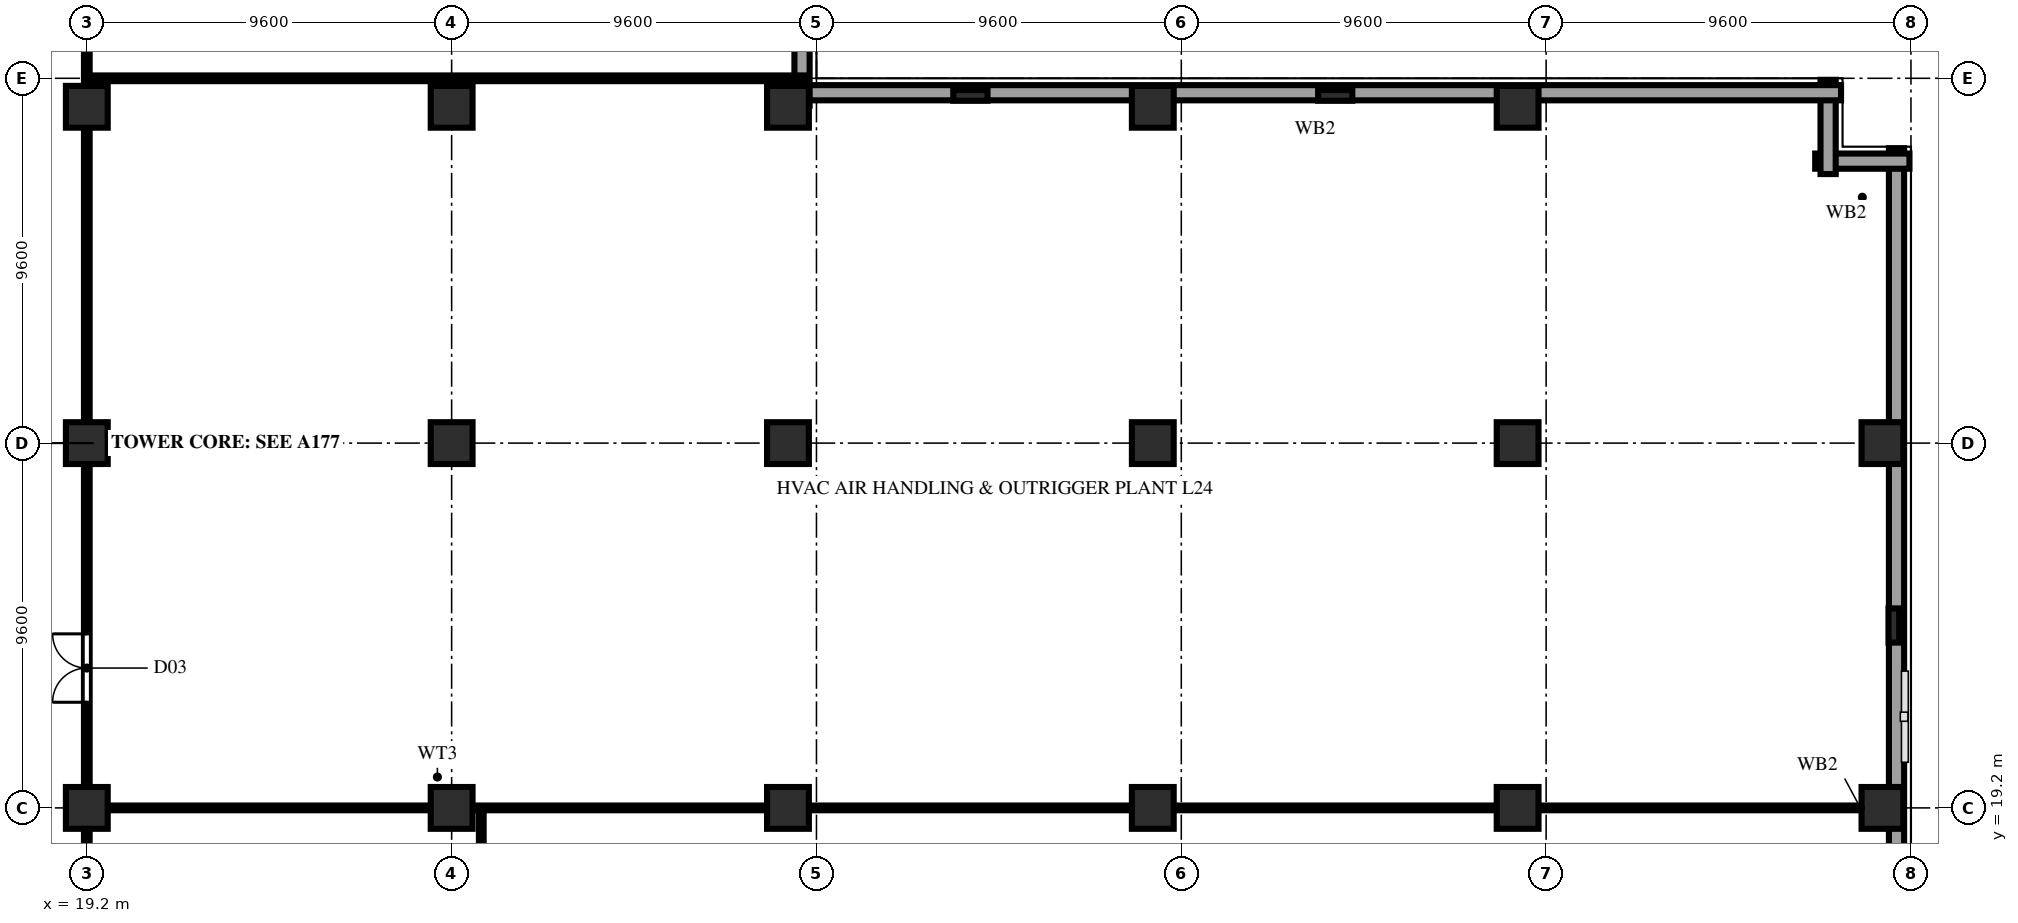
"""IFC4 building model, lengths in metres.
Left out: names, types, materials, properties, quantities, classifications, styles, units other than length and angle.
Written with IfcOpenShell. Run it as: python <this file> out.ifc"""

import sys

from ifc_helpers import new_model, si_unit, direction, frame, frame_2d, origin, origin_2d, place, context, subcontext, project, spatial, rectangle, extrude, element, fill, save


model = new_model("IFC4")
c1 = context("Model", 3, precision=1e-05, world=origin(), true_north=direction((0.0, 1.0)))
c2 = subcontext(c1, "Body", "Model", "MODEL_VIEW")
j1 = project(units=[si_unit("LENGTHUNIT", "METRE"), si_unit("PLANEANGLEUNIT", "RADIAN")], contexts=[c1])
p1 = place(None, origin())
s1 = spatial("IfcSite", under=j1, at=p1, CompositionType="ELEMENT")
p2 = place(p1, origin())
s2 = spatial("IfcBuilding", under=s1, at=p2, CompositionType="ELEMENT")
p3 = place(p2, frame((0.0, 0.0, 96.4)))
s3 = spatial("IfcBuildingStorey", under=s2, at=p3, CompositionType="ELEMENT", Elevation=96.4)
for number, where, z_axis, x_axis in (
    (1, (19.2, 19.2, 0.0), (0.0, 0.0, 1.0), (1.0, 0.0, 0.0)),
    (2, (19.2, 28.8, 0.0), (0.0, 0.0, 1.0), (1.0, 0.0, 0.0)),
    (3, (19.2, 37.65, 0.0), (0.0, 0.0, 1.0), (1.0, 0.0, 0.0)),
    (4, (28.8, 19.2, 0.0), (0.0, 0.0, 1.0), (1.0, 0.0, 0.0)),
    (5, (28.8, 28.8, 0.0), (0.0, 0.0, 1.0), (1.0, 0.0, 0.0)),
    (6, (28.8, 37.65, 0.0), (0.0, 0.0, 1.0), (1.0, 0.0, 0.0)),
    (7, (37.65, 19.2, 0.0), (0.0, 0.0, 1.0), (1.0, 0.0, 0.0)),
    (8, (37.65, 28.8, 0.0), (0.0, 0.0, 1.0), (1.0, 0.0, 0.0)),
    (9, (37.65, 37.65, 0.0), (0.0, 0.0, 1.0), (1.0, 0.0, 0.0)),
    (10, (47.25, 19.2, 0.0), (0.0, 0.0, 1.0), (1.0, 0.0, 0.0)),
    (11, (47.25, 28.8, 0.0), (0.0, 0.0, 1.0), (1.0, 0.0, 0.0)),
    (12, (47.25, 37.65, 0.0), (0.0, 0.0, 1.0), (1.0, 0.0, 0.0)),
    (13, (56.85, 19.2, 0.0), (0.0, 0.0, 1.0), (1.0, 0.0, 0.0)),
    (14, (56.85, 28.8, 0.0), (0.0, 0.0, 1.0), (1.0, 0.0, 0.0)),
    (15, (56.85, 37.65, 0.0), (0.0, 0.0, 1.0), (1.0, 0.0, 0.0)),
):
    element("IfcColumn", number, at=place(p3, frame(where, z_axis=z_axis, x_axis=x_axis)), inside=s3, PredefinedType="COLUMN", context=c2, shape_type="SweptSolid", body=[
        extrude(rectangle(XDim=1.1, YDim=1.1, at=origin_2d()), origin(), (0.0, 0.0, 1.0), 5.0),
    ])
for number, where, z_axis, x_axis in (
    (16, (66.45, 19.2, 0.0), (0.0, 0.0, 1.0), (1.0, 0.0, 0.0)),
    (17, (66.45, 28.8, 0.0), (0.0, 0.0, 1.0), (1.0, 0.0, 0.0)),
):
    element("IfcColumn", number, at=place(p3, frame(where, z_axis=z_axis, x_axis=x_axis)), inside=s3, PredefinedType="COLUMN", context=c2, shape_type="SweptSolid", body=[
        extrude(rectangle(XDim=1.1, YDim=1.1, at=origin_2d()), origin(), (0.0, 0.0, 1.0), 4.7),
    ])
p4 = place(p3, frame((66.75, 24.0, 0.0), z_axis=(0.0, 0.0, 1.0), x_axis=(0.0, 1.0, 0.0)))
e18 = element("IfcColumn", 18, at=p4, inside=s3, PredefinedType="PILASTER", context=c2, shape_type="SweptSolid", body=[
    extrude(rectangle(XDim=0.9, YDim=0.28, at=origin_2d()), origin(), (0.0, 0.0, 1.0), 4.7),
])
for number, where, z_axis, x_axis in (
    (19, (42.45, 37.95, 0.0), (0.0, 0.0, 1.0), (1.0, 0.0, 0.0)),
    (20, (52.05, 37.95, 0.0), (0.0, 0.0, 1.0), (1.0, 0.0, 0.0)),
):
    element("IfcColumn", number, at=place(p3, frame(where, z_axis=z_axis, x_axis=x_axis)), inside=s3, PredefinedType="PILASTER", context=c2, shape_type="SweptSolid", body=[
        extrude(rectangle(XDim=0.9, YDim=0.28, at=origin_2d()), origin(), (0.0, 0.0, 1.0), 5.0),
    ])
p5 = place(p3, frame((66.82, 1.84, 0.0), z_axis=(0.0, 0.0, 1.0), x_axis=(0.0, 1.0, 0.0)))
e21 = element("IfcWall", 21, at=p5, inside=s3, PredefinedType="SOLIDWALL", context=c2, shape_type="SweptSolid", body=[
    extrude(rectangle(XDim=34.72, YDim=0.4, at=frame_2d((17.36, 0.0))), origin(), (0.0, 0.0, 1.0), 4.7),
])
p6 = place(p3, frame((67.16, 36.22, 0.0), z_axis=(0.0, 0.0, 1.0), x_axis=(-1.0, 0.0, 0.0)))
e22 = element("IfcWall", 22, at=p6, inside=s3, PredefinedType="SOLIDWALL", context=c2, shape_type="SweptSolid", body=[
    extrude(rectangle(XDim=2.48, YDim=0.4, at=frame_2d((1.24, 0.0))), origin(), (0.0, 0.0, 1.0), 4.7),
])
p7 = place(p3, frame((65.02, 35.88, 0.0), z_axis=(0.0, 0.0, 1.0), x_axis=(0.0, 1.0, 0.0)))
e23 = element("IfcWall", 23, at=p7, inside=s3, PredefinedType="SOLIDWALL", context=c2, shape_type="SweptSolid", body=[
    extrude(rectangle(XDim=2.48, YDim=0.4, at=frame_2d((1.24, 0.0))), origin(), (0.0, 0.0, 1.0), 4.7),
])
for number, where, z_axis, x_axis in (
    (24, (65.36, 38.02, 0.0), (0.0, 0.0, 1.0), (-1.0, 0.0, 0.0)),
    (25, (38.02, 37.68, 0.0), (0.0, 0.0, 1.0), (0.0, 1.0, 0.0)),
):
    element("IfcWall", number, at=place(p3, frame(where, z_axis=z_axis, x_axis=x_axis)), inside=s3, PredefinedType="SOLIDWALL", context=c2, shape_type="SweptSolid", body=[
        extrude(rectangle(XDim=27.68, YDim=0.4, at=frame_2d((13.84, 0.0))), origin(), (0.0, 0.0, 1.0), 4.74),
    ])
p8 = place(p3, frame((29.58, 17.95, 0.0), z_axis=(0.0, 0.0, 1.0), x_axis=(0.0, 1.0, 0.0)))
e26 = element("IfcWall", 26, at=p8, inside=s3, PredefinedType="PARTITIONING", context=c2, shape_type="SweptSolid", body=[
    extrude(rectangle(XDim=1.25, YDim=0.125, at=frame_2d((0.625, 0.0))), origin(), (0.0, 0.0, 1.0), 4.74),
])
p9 = place(p3, frame((19.2, 19.2, 0.0), z_axis=(0.0, 0.0, 1.0), x_axis=(1.0, 0.0, 0.0)))
e27 = element("IfcWall", 27, at=p9, inside=s3, PredefinedType="PARTITIONING", context=c2, shape_type="SweptSolid", body=[
    extrude(rectangle(XDim=18.45, YDim=0.125, at=frame_2d((9.225, 0.0))), origin(), (0.0, 0.0, 1.0), 2.323),
])
p10 = place(p3, frame((37.65, 19.2, 0.0), z_axis=(0.0, 0.0, 1.0), x_axis=(1.0, 0.0, 0.0)))
e28 = element("IfcWall", 28, at=p10, inside=s3, PredefinedType="PARTITIONING", context=c2, shape_type="SweptSolid", body=[
    extrude(rectangle(XDim=19.2, YDim=0.125, at=frame_2d((9.6, 0.0))), origin(), (0.0, 0.0, 1.0), 3.967),
])
p11 = place(p3, frame((56.85, 19.2, 0.0), z_axis=(0.0, 0.0, 1.0), x_axis=(1.0, 0.0, 0.0)))
e29 = element("IfcWall", 29, at=p11, inside=s3, PredefinedType="PARTITIONING", context=c2, shape_type="SweptSolid", body=[
    extrude(rectangle(XDim=9.6, YDim=0.125, at=frame_2d((4.8, 0.0))), origin(), (0.0, 0.0, 1.0), 3.927),
])
p12 = place(p3, frame((66.45, 19.2, 0.0), z_axis=(0.0, 0.0, 1.0), x_axis=(1.0, 0.0, 0.0)))
e30 = element("IfcWall", 30, at=p12, inside=s3, PredefinedType="PARTITIONING", context=c2, shape_type="SweptSolid", body=[
    extrude(rectangle(XDim=0.53, YDim=0.125, at=frame_2d((0.265, 0.0))), origin(), (0.0, 0.0, 1.0), 4.74),
])
p13 = place(p3, frame((19.2, 38.4, 0.0), z_axis=(0.0, 0.0, 1.0), x_axis=(1.0, 0.0, 0.0)))
e31 = element("IfcWall", 31, at=p13, inside=s3, PredefinedType="PARTITIONING", context=c2, shape_type="SweptSolid", body=[
    extrude(rectangle(XDim=18.98, YDim=0.15, at=frame_2d((9.49, 0.0))), origin(), (0.0, 0.0, 1.0), 4.74),
])
p14 = place(p3, frame((19.2, 9.98, 0.0), z_axis=(0.0, 0.0, 1.0), x_axis=(0.0, 1.0, 0.0)))
e32 = element("IfcWall", 32, at=p14, inside=s3, PredefinedType="PARTITIONING", context=c2, shape_type="SweptSolid", body=[
    extrude(rectangle(XDim=56.47, YDim=0.15, at=frame_2d((28.235, 0.0))), origin(), (0.0, 0.0, 1.0), 3.967),
])
p15 = place(p14, frame((2.0, 0.0, 0.0)))
e33 = element("IfcOpeningElement", 33, at=p15, cuts=e32, PredefinedType="OPENING", context=c2, shape_type="SweptSolid", body=[
    extrude(rectangle(XDim=1.8, YDim=2.2, at=frame_2d((0.9, 1.1))), frame((0.0, 0.087, 0.0), z_axis=(0.0, -1.0, 0.0), x_axis=(1.0, 0.0, 0.0)), (0.0, 0.0, 1.0), 0.174),
])
p16 = place(p14, frame((12.0, 0.0, 0.0)))
e34 = element("IfcOpeningElement", 34, at=p16, cuts=e32, PredefinedType="OPENING", context=c2, shape_type="SweptSolid", body=[
    extrude(rectangle(XDim=1.8, YDim=2.2, at=frame_2d((0.9, 1.1))), frame((0.0, 0.087, 0.0), z_axis=(0.0, -1.0, 0.0), x_axis=(1.0, 0.0, 0.0)), (0.0, 0.0, 1.0), 0.174),
])
p17 = place(p14, frame((30.5, 0.0, 0.0)))
e35 = element("IfcOpeningElement", 35, at=p17, cuts=e32, PredefinedType="OPENING", context=c2, shape_type="SweptSolid", body=[
    extrude(rectangle(XDim=1.2, YDim=2.2, at=frame_2d((0.6, 1.1))), frame((0.0, 0.087, 0.0), z_axis=(0.0, -1.0, 0.0), x_axis=(1.0, 0.0, 0.0)), (0.0, 0.0, 1.0), 0.174),
])
p18 = place(p14, frame((40.5, 0.0, 0.0)))
e36 = element("IfcOpeningElement", 36, at=p18, cuts=e32, PredefinedType="OPENING", context=c2, shape_type="SweptSolid", body=[
    extrude(rectangle(XDim=1.8, YDim=2.2, at=frame_2d((0.9, 1.1))), frame((0.0, 0.087, 0.0), z_axis=(0.0, -1.0, 0.0), x_axis=(1.0, 0.0, 0.0)), (0.0, 0.0, 1.0), 0.174),
])
p19 = place(p16, origin())
e37 = element("IfcDoor", 37, at=p19, inside=s3, OperationType="DOUBLE_DOOR_SINGLE_SWING", PredefinedType="DOOR", context=c2, shape_type="SweptSolid", body=[
    extrude(rectangle(XDim=1.8, YDim=2.2, at=frame_2d((0.9, 1.1))), frame((0.0, 0.025, 0.0), z_axis=(0.0, -1.0, 0.0), x_axis=(1.0, 0.0, 0.0)), (0.0, 0.0, 1.0), 0.05),
])
fill(e34, e37)
save(model, sys.argv[1])
